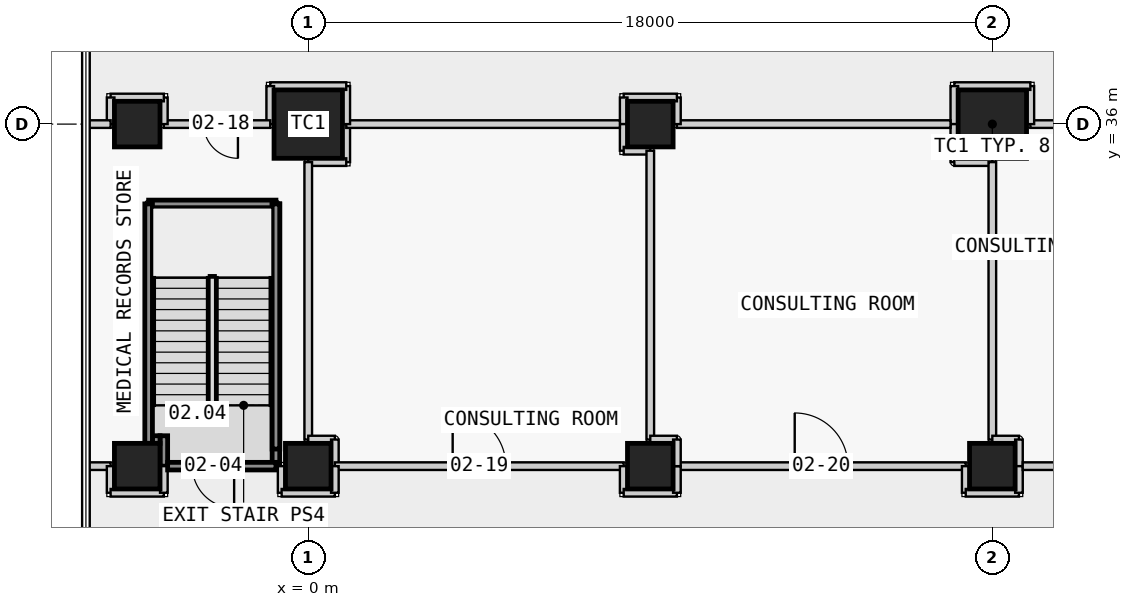
"""IFC4 building model, lengths in metres.
Left out: names, types, materials, properties, quantities, classifications, styles, units other than length and angle.
Written with IfcOpenShell. Run it as: python <this file> out.ifc"""

import sys

from ifc_helpers import new_model, si_unit, direction, frame, frame_2d, origin, origin_2d, place, context, subcontext, project, spatial, rectangle, extrude, element, fill, save


model = new_model("IFC4")
c1 = context("Model", 3, precision=1e-05, world=origin(), true_north=direction((0.0, 1.0)))
c2 = subcontext(c1, "Body", "Model", "MODEL_VIEW")
j1 = project(units=[si_unit("LENGTHUNIT", "METRE"), si_unit("PLANEANGLEUNIT", "RADIAN")], contexts=[c1])
p1 = place(None, origin())
s1 = spatial("IfcSite", under=j1, at=p1, CompositionType="ELEMENT")
p2 = place(p1, origin())
s2 = spatial("IfcBuilding", under=s1, at=p2, CompositionType="ELEMENT")
p3 = place(p2, frame((0.0, 0.0, 12.8)))
s3 = spatial("IfcBuildingStorey", under=s2, at=p3, CompositionType="ELEMENT", Elevation=12.8)
for number, where, z_axis, x_axis in (
    (1, (-4.5, 27.0, 0.0), (0.0, 0.0, 1.0), (1.0, 0.0, 0.0)),
    (2, (-4.5, 36.0, 0.0), (0.0, 0.0, 1.0), (1.0, 0.0, 0.0)),
    (3, (0.0, 27.0, 0.0), (0.0, 0.0, 1.0), (1.0, 0.0, 0.0)),
):
    element("IfcColumn", number, at=place(p3, frame(where, z_axis=z_axis, x_axis=x_axis)), inside=s3, PredefinedType="COLUMN", context=c2, shape_type="SweptSolid", body=[
        extrude(rectangle(XDim=1.2, YDim=1.2, at=origin_2d()), origin(), (0.0, 0.0, 1.0), 4.5),
    ])
p4 = place(p3, frame((0.0, 36.0, 0.0), z_axis=(0.0, 0.0, 1.0), x_axis=(1.0, 0.0, 0.0)))
e4 = element("IfcColumn", 4, at=p4, inside=s3, PredefinedType="COLUMN", context=c2, shape_type="SweptSolid", body=[
    extrude(rectangle(XDim=1.8, YDim=1.8, at=origin_2d()), origin(), (0.0, 0.0, 1.0), 4.5),
])
for number, where, z_axis, x_axis in (
    (5, (9.0, 27.0, 0.0), (0.0, 0.0, 1.0), (1.0, 0.0, 0.0)),
    (6, (9.0, 36.0, 0.0), (0.0, 0.0, 1.0), (1.0, 0.0, 0.0)),
    (7, (18.0, 27.0, 0.0), (0.0, 0.0, 1.0), (1.0, 0.0, 0.0)),
):
    element("IfcColumn", number, at=place(p3, frame(where, z_axis=z_axis, x_axis=x_axis)), inside=s3, PredefinedType="COLUMN", context=c2, shape_type="SweptSolid", body=[
        extrude(rectangle(XDim=1.2, YDim=1.2, at=origin_2d()), origin(), (0.0, 0.0, 1.0), 4.5),
    ])
p5 = place(p3, frame((18.0, 36.0, 0.0), z_axis=(0.0, 0.0, 1.0), x_axis=(1.0, 0.0, 0.0)))
e8 = element("IfcColumn", 8, at=p5, inside=s3, PredefinedType="COLUMN", context=c2, shape_type="SweptSolid", body=[
    extrude(rectangle(XDim=1.8, YDim=1.8, at=origin_2d()), origin(), (0.0, 0.0, 1.0), 4.5),
])
p6 = place(p3, frame((26.3, 36.0, 0.0), z_axis=(0.0, 0.0, 1.0), x_axis=(-1.0, 0.0, 0.0)))
e9 = element("IfcWall", 9, at=p6, inside=s3, PredefinedType="PARTITIONING", context=c2, shape_type="SweptSolid", body=[
    extrude(rectangle(XDim=7.3, YDim=0.2, at=frame_2d((3.65, 0.0))), origin(), (0.0, 0.0, 1.0), 3.45),
])
p7 = place(p6, frame((2.85, 0.0, 0.0)))
e10 = element("IfcOpeningElement", 10, at=p7, cuts=e9, PredefinedType="OPENING", context=c2, shape_type="SweptSolid", body=[
    extrude(rectangle(XDim=1.4, YDim=2.1, at=frame_2d((0.7, 1.05))), frame((0.0, 0.11, 0.0), z_axis=(0.0, -1.0, 0.0), x_axis=(1.0, 0.0, 0.0)), (0.0, 0.0, 1.0), 0.22),
])
p8 = place(p3, frame((19.0, 36.0, 0.0), z_axis=(0.0, 0.0, 1.0), x_axis=(0.0, 1.0, 0.0)))
e11 = element("IfcWall", 11, at=p8, inside=s3, PredefinedType="PARTITIONING", context=c2, shape_type="SweptSolid", body=[
    extrude(rectangle(XDim=1.0, YDim=0.2, at=frame_2d((0.5, 0.0))), origin(), (0.0, 0.0, 1.0), 3.45),
])
p9 = place(p3, frame((19.0, 37.0, 0.0), z_axis=(0.0, 0.0, 1.0), x_axis=(-1.0, 0.0, 0.0)))
e12 = element("IfcWall", 12, at=p9, inside=s3, PredefinedType="PARTITIONING", context=c2, shape_type="SweptSolid", body=[
    extrude(rectangle(XDim=2.0, YDim=0.2, at=frame_2d((1.0, 0.0))), origin(), (0.0, 0.0, 1.0), 3.45),
])
for number, where, z_axis, x_axis in (
    (13, (17.0, 37.0, 0.0), (0.0, 0.0, 1.0), (0.0, -1.0, 0.0)),
    (14, (17.0, 36.0, 0.0), (0.0, 0.0, 1.0), (0.0, -1.0, 0.0)),
    (15, (17.0, 35.0, 0.0), (0.0, 0.0, 1.0), (1.0, 0.0, 0.0)),
):
    element("IfcWall", number, at=place(p3, frame(where, z_axis=z_axis, x_axis=x_axis)), inside=s3, PredefinedType="PARTITIONING", context=c2, shape_type="SweptSolid", body=[
        extrude(rectangle(XDim=1.0, YDim=0.2, at=frame_2d((0.5, 0.0))), origin(), (0.0, 0.0, 1.0), 3.45),
    ])
p10 = place(p3, frame((18.0, 35.0, 0.0), z_axis=(0.0, 0.0, 1.0), x_axis=(0.0, -1.0, 0.0)))
e16 = element("IfcWall", 16, at=p10, inside=s3, PredefinedType="PARTITIONING", context=c2, shape_type="SweptSolid", body=[
    extrude(rectangle(XDim=7.3, YDim=0.2, at=frame_2d((3.65, 0.0))), origin(), (0.0, 0.0, 1.0), 3.45),
])
for number, where, z_axis, x_axis in (
    (17, (18.0, 27.7, 0.0), (0.0, 0.0, 1.0), (1.0, 0.0, 0.0)),
    (18, (18.7, 27.7, 0.0), (0.0, 0.0, 1.0), (0.0, -1.0, 0.0)),
):
    element("IfcWall", number, at=place(p3, frame(where, z_axis=z_axis, x_axis=x_axis)), inside=s3, PredefinedType="PARTITIONING", context=c2, shape_type="SweptSolid", body=[
        extrude(rectangle(XDim=0.7, YDim=0.2, at=frame_2d((0.35, 0.0))), origin(), (0.0, 0.0, 1.0), 3.45),
    ])
for number, where, z_axis, x_axis in (
    (19, (1.0, 36.0, 0.0), (0.0, 0.0, 1.0), (0.0, -1.0, 0.0)),
    (20, (1.0, 35.0, 0.0), (0.0, 0.0, 1.0), (-1.0, 0.0, 0.0)),
):
    element("IfcWall", number, at=place(p3, frame(where, z_axis=z_axis, x_axis=x_axis)), inside=s3, PredefinedType="PARTITIONING", context=c2, shape_type="SweptSolid", body=[
        extrude(rectangle(XDim=1.0, YDim=0.2, at=frame_2d((0.5, 0.0))), origin(), (0.0, 0.0, 1.0), 3.45),
    ])
p11 = place(p3, frame((0.0, 35.0, 0.0), z_axis=(0.0, 0.0, 1.0), x_axis=(0.0, -1.0, 0.0)))
e21 = element("IfcWall", 21, at=p11, inside=s3, PredefinedType="PARTITIONING", context=c2, shape_type="SweptSolid", body=[
    extrude(rectangle(XDim=7.3, YDim=0.2, at=frame_2d((3.65, 0.0))), origin(), (0.0, 0.0, 1.0), 3.45),
])
for number, where, z_axis, x_axis in (
    (22, (0.0, 27.7, 0.0), (0.0, 0.0, 1.0), (1.0, 0.0, 0.0)),
    (23, (0.7, 27.7, 0.0), (0.0, 0.0, 1.0), (0.0, -1.0, 0.0)),
):
    element("IfcWall", number, at=place(p3, frame(where, z_axis=z_axis, x_axis=x_axis)), inside=s3, PredefinedType="PARTITIONING", context=c2, shape_type="SweptSolid", body=[
        extrude(rectangle(XDim=0.7, YDim=0.2, at=frame_2d((0.35, 0.0))), origin(), (0.0, 0.0, 1.0), 3.45),
    ])
p12 = place(p3, frame((9.7, 27.0, 0.0), z_axis=(0.0, 0.0, 1.0), x_axis=(1.0, 0.0, 0.0)))
e24 = element("IfcWall", 24, at=p12, inside=s3, PredefinedType="PARTITIONING", context=c2, shape_type="SweptSolid", body=[
    extrude(rectangle(XDim=7.6, YDim=0.2, at=frame_2d((3.8, 0.0))), origin(), (0.0, 0.0, 1.0), 3.45),
])
p13 = place(p12, frame((3.1, 0.0, 0.0)))
e25 = element("IfcOpeningElement", 25, at=p13, cuts=e24, PredefinedType="OPENING", context=c2, shape_type="SweptSolid", body=[
    extrude(rectangle(XDim=1.4, YDim=2.1, at=frame_2d((0.7, 1.05))), frame((0.0, 0.11, 0.0), z_axis=(0.0, -1.0, 0.0), x_axis=(1.0, 0.0, 0.0)), (0.0, 0.0, 1.0), 0.22),
])
p14 = place(p3, frame((17.3, 27.0, 0.0), z_axis=(0.0, 0.0, 1.0), x_axis=(0.0, -1.0, 0.0)))
e26 = element("IfcWall", 26, at=p14, inside=s3, PredefinedType="PARTITIONING", context=c2, shape_type="SweptSolid", body=[
    extrude(rectangle(XDim=0.7, YDim=0.2, at=frame_2d((0.35, 0.0))), origin(), (0.0, 0.0, 1.0), 3.45),
])
p15 = place(p3, frame((17.3, 26.3, 0.0), z_axis=(0.0, 0.0, 1.0), x_axis=(1.0, 0.0, 0.0)))
e27 = element("IfcWall", 27, at=p15, inside=s3, PredefinedType="PARTITIONING", context=c2, shape_type="SweptSolid", body=[
    extrude(rectangle(XDim=1.4, YDim=0.2, at=frame_2d((0.7, 0.0))), origin(), (0.0, 0.0, 1.0), 4.15),
])
p16 = place(p3, frame((18.7, 26.3, 0.0), z_axis=(0.0, 0.0, 1.0), x_axis=(0.0, 1.0, 0.0)))
e28 = element("IfcWall", 28, at=p16, inside=s3, PredefinedType="PARTITIONING", context=c2, shape_type="SweptSolid", body=[
    extrude(rectangle(XDim=0.7, YDim=0.2, at=frame_2d((0.35, 0.0))), origin(), (0.0, 0.0, 1.0), 3.45),
])
p17 = place(p3, frame((0.7, 27.0, 0.0), z_axis=(0.0, 0.0, 1.0), x_axis=(1.0, 0.0, 0.0)))
e29 = element("IfcWall", 29, at=p17, inside=s3, PredefinedType="PARTITIONING", context=c2, shape_type="SweptSolid", body=[
    extrude(rectangle(XDim=7.6, YDim=0.2, at=frame_2d((3.8, 0.0))), origin(), (0.0, 0.0, 1.0), 3.45),
])
p18 = place(p17, frame((3.1, 0.0, 0.0)))
e30 = element("IfcOpeningElement", 30, at=p18, cuts=e29, PredefinedType="OPENING", context=c2, shape_type="SweptSolid", body=[
    extrude(rectangle(XDim=1.4, YDim=2.1, at=frame_2d((0.7, 1.05))), frame((0.0, 0.11, 0.0), z_axis=(0.0, -1.0, 0.0), x_axis=(1.0, 0.0, 0.0)), (0.0, 0.0, 1.0), 0.22),
])
p19 = place(p3, frame((8.3, 27.0, 0.0), z_axis=(0.0, 0.0, 1.0), x_axis=(0.0, -1.0, 0.0)))
e31 = element("IfcWall", 31, at=p19, inside=s3, PredefinedType="PARTITIONING", context=c2, shape_type="SweptSolid", body=[
    extrude(rectangle(XDim=0.7, YDim=0.2, at=frame_2d((0.35, 0.0))), origin(), (0.0, 0.0, 1.0), 3.45),
])
p20 = place(p3, frame((8.3, 26.3, 0.0), z_axis=(0.0, 0.0, 1.0), x_axis=(1.0, 0.0, 0.0)))
e32 = element("IfcWall", 32, at=p20, inside=s3, PredefinedType="PARTITIONING", context=c2, shape_type="SweptSolid", body=[
    extrude(rectangle(XDim=1.4, YDim=0.2, at=frame_2d((0.7, 0.0))), origin(), (0.0, 0.0, 1.0), 4.15),
])
p21 = place(p3, frame((9.7, 26.3, 0.0), z_axis=(0.0, 0.0, 1.0), x_axis=(0.0, 1.0, 0.0)))
e33 = element("IfcWall", 33, at=p21, inside=s3, PredefinedType="PARTITIONING", context=c2, shape_type="SweptSolid", body=[
    extrude(rectangle(XDim=0.7, YDim=0.2, at=frame_2d((0.35, 0.0))), origin(), (0.0, 0.0, 1.0), 3.45),
])
p22 = place(p3, frame((-4.2, 33.9, 0.0), z_axis=(0.0, 0.0, 1.0), x_axis=(1.0, 0.0, 0.0)))
e34 = element("IfcWall", 34, at=p22, inside=s3, PredefinedType="PARTITIONING", context=c2, shape_type="SweptSolid", body=[
    extrude(rectangle(XDim=3.35, YDim=0.2, at=frame_2d((1.675, 0.0))), origin(), (0.0, 0.0, 1.0), 4.15),
])
p23 = place(p3, frame((-0.85, 33.9, 0.0), z_axis=(0.0, 0.0, 1.0), x_axis=(0.0, -1.0, 0.0)))
e35 = element("IfcWall", 35, at=p23, inside=s3, PredefinedType="PARTITIONING", context=c2, shape_type="SweptSolid", body=[
    extrude(rectangle(XDim=6.9, YDim=0.2, at=frame_2d((3.45, 0.0))), origin(), (0.0, 0.0, 1.0), 3.45),
])
p24 = place(p3, frame((16.9, 36.0, 0.0), z_axis=(0.0, 0.0, 1.0), x_axis=(-1.0, 0.0, 0.0)))
e36 = element("IfcWall", 36, at=p24, inside=s3, PredefinedType="PARTITIONING", context=c2, shape_type="SweptSolid", body=[
    extrude(rectangle(XDim=7.2, YDim=0.2, at=frame_2d((3.6, 0.0))), origin(), (0.0, 0.0, 1.0), 3.45),
])
p25 = place(p3, frame((9.7, 36.0, 0.0), z_axis=(0.0, 0.0, 1.0), x_axis=(0.0, 1.0, 0.0)))
e37 = element("IfcWall", 37, at=p25, inside=s3, PredefinedType="PARTITIONING", context=c2, shape_type="SweptSolid", body=[
    extrude(rectangle(XDim=0.7, YDim=0.2, at=frame_2d((0.35, 0.0))), origin(), (0.0, 0.0, 1.0), 3.45),
])
p26 = place(p3, frame((9.7, 36.7, 0.0), z_axis=(0.0, 0.0, 1.0), x_axis=(-1.0, 0.0, 0.0)))
e38 = element("IfcWall", 38, at=p26, inside=s3, PredefinedType="PARTITIONING", context=c2, shape_type="SweptSolid", body=[
    extrude(rectangle(XDim=1.4, YDim=0.2, at=frame_2d((0.7, 0.0))), origin(), (0.0, 0.0, 1.0), 4.15),
])
for number, where, z_axis, x_axis in (
    (39, (8.3, 36.7, 0.0), (0.0, 0.0, 1.0), (0.0, -1.0, 0.0)),
    (40, (8.3, 36.0, 0.0), (0.0, 0.0, 1.0), (0.0, -1.0, 0.0)),
    (41, (8.3, 35.3, 0.0), (0.0, 0.0, 1.0), (1.0, 0.0, 0.0)),
):
    element("IfcWall", number, at=place(p3, frame(where, z_axis=z_axis, x_axis=x_axis)), inside=s3, PredefinedType="PARTITIONING", context=c2, shape_type="SweptSolid", body=[
        extrude(rectangle(XDim=0.7, YDim=0.2, at=frame_2d((0.35, 0.0))), origin(), (0.0, 0.0, 1.0), 3.45),
    ])
p27 = place(p3, frame((9.0, 35.3, 0.0), z_axis=(0.0, 0.0, 1.0), x_axis=(0.0, -1.0, 0.0)))
e42 = element("IfcWall", 42, at=p27, inside=s3, PredefinedType="PARTITIONING", context=c2, shape_type="SweptSolid", body=[
    extrude(rectangle(XDim=7.6, YDim=0.2, at=frame_2d((3.8, 0.0))), origin(), (0.0, 0.0, 1.0), 3.45),
])
p28 = place(p3, frame((18.8, 27.0, 0.0), z_axis=(0.0, 0.0, 1.0), x_axis=(1.0, 0.0, 0.0)))
e43 = element("IfcWall", 43, at=p28, inside=s3, PredefinedType="PARTITIONING", context=c2, shape_type="SweptSolid", body=[
    extrude(rectangle(XDim=7.5, YDim=0.2, at=frame_2d((3.75, 0.0))), origin(), (0.0, 0.0, 1.0), 3.45),
])
p29 = place(p3, frame((8.2, 36.0, 0.0), z_axis=(0.0, 0.0, 1.0), x_axis=(-1.0, 0.0, 0.0)))
e44 = element("IfcWall", 44, at=p29, inside=s3, PredefinedType="PARTITIONING", context=c2, shape_type="SweptSolid", body=[
    extrude(rectangle(XDim=7.2, YDim=0.2, at=frame_2d((3.6, 0.0))), origin(), (0.0, 0.0, 1.0), 3.45),
])
p30 = place(p3, frame((-3.8, 27.0, 0.0), z_axis=(0.0, 0.0, 1.0), x_axis=(0.0, 1.0, 0.0)))
e45 = element("IfcWall", 45, at=p30, inside=s3, PredefinedType="PARTITIONING", context=c2, shape_type="SweptSolid", body=[
    extrude(rectangle(XDim=0.8, YDim=0.2, at=frame_2d((0.4, 0.0))), origin(), (0.0, 0.0, 1.0), 3.45),
])
p31 = place(p3, frame((-3.9, 27.7, 0.0), z_axis=(0.0, 0.0, 1.0), x_axis=(-1.0, 0.0, 0.0)))
e46 = element("IfcWall", 46, at=p31, inside=s3, PredefinedType="PARTITIONING", context=c2, shape_type="SweptSolid", body=[
    extrude(rectangle(XDim=0.2, YDim=0.2, at=frame_2d((0.1, 0.0))), origin(), (0.0, 0.0, 1.0), 4.15),
])
p32 = place(p3, frame((-4.2, 27.6, 0.0), z_axis=(0.0, 0.0, 1.0), x_axis=(0.0, 1.0, 0.0)))
e47 = element("IfcWall", 47, at=p32, inside=s3, PredefinedType="PARTITIONING", context=c2, shape_type="SweptSolid", body=[
    extrude(rectangle(XDim=6.3, YDim=0.2, at=frame_2d((3.15, 0.0))), origin(), (0.0, 0.0, 1.0), 4.15),
])
p33 = place(p3, frame((1.0, 36.0, 0.0), z_axis=(0.0, 0.0, 1.0), x_axis=(0.0, 1.0, 0.0)))
e48 = element("IfcWall", 48, at=p33, inside=s3, PredefinedType="PARTITIONING", context=c2, shape_type="SweptSolid", body=[
    extrude(rectangle(XDim=1.0, YDim=0.2, at=frame_2d((0.5, 0.0))), origin(), (0.0, 0.0, 1.0), 3.45),
])
p34 = place(p3, frame((1.0, 37.0, 0.0), z_axis=(0.0, 0.0, 1.0), x_axis=(-1.0, 0.0, 0.0)))
e49 = element("IfcWall", 49, at=p34, inside=s3, PredefinedType="PARTITIONING", context=c2, shape_type="SweptSolid", body=[
    extrude(rectangle(XDim=2.0, YDim=0.2, at=frame_2d((1.0, 0.0))), origin(), (0.0, 0.0, 1.0), 3.45),
])
p35 = place(p3, frame((-1.0, 37.0, 0.0), z_axis=(0.0, 0.0, 1.0), x_axis=(0.0, -1.0, 0.0)))
e50 = element("IfcWall", 50, at=p35, inside=s3, PredefinedType="PARTITIONING", context=c2, shape_type="SweptSolid", body=[
    extrude(rectangle(XDim=1.0, YDim=0.2, at=frame_2d((0.5, 0.0))), origin(), (0.0, 0.0, 1.0), 3.45),
])
p36 = place(p3, frame((-1.0, 36.0, 0.0), z_axis=(0.0, 0.0, 1.0), x_axis=(-1.0, 0.0, 0.0)))
e51 = element("IfcWall", 51, at=p36, inside=s3, PredefinedType="PARTITIONING", context=c2, shape_type="SweptSolid", body=[
    extrude(rectangle(XDim=2.8, YDim=0.2, at=frame_2d((1.4, 0.0))), origin(), (0.0, 0.0, 1.0), 3.45),
])
p37 = place(p36, frame((0.85, 0.0, 0.0)))
e52 = element("IfcOpeningElement", 52, at=p37, cuts=e51, PredefinedType="OPENING", context=c2, shape_type="SweptSolid", body=[
    extrude(rectangle(XDim=0.9, YDim=2.1, at=frame_2d((0.45, 1.05))), frame((0.0, 0.11, 0.0), z_axis=(0.0, -1.0, 0.0), x_axis=(1.0, 0.0, 0.0)), (0.0, 0.0, 1.0), 0.22),
])
p38 = place(p3, frame((-5.85, 27.0, 0.0), z_axis=(0.0, 0.0, 1.0), x_axis=(1.0, 0.0, 0.0)))
e53 = element("IfcWall", 53, at=p38, inside=s3, PredefinedType="PARTITIONING", context=c2, shape_type="SweptSolid", body=[
    extrude(rectangle(XDim=0.65, YDim=0.2, at=frame_2d((0.325, 0.0))), origin(), (0.0, 0.0, 1.0), 4.15),
])
p39 = place(p3, frame((-5.2, 27.0, 0.0), z_axis=(0.0, 0.0, 1.0), x_axis=(0.0, -1.0, 0.0)))
e54 = element("IfcWall", 54, at=p39, inside=s3, PredefinedType="PARTITIONING", context=c2, shape_type="SweptSolid", body=[
    extrude(rectangle(XDim=0.7, YDim=0.2, at=frame_2d((0.35, 0.0))), origin(), (0.0, 0.0, 1.0), 4.15),
])
p40 = place(p3, frame((-5.2, 26.3, 0.0), z_axis=(0.0, 0.0, 1.0), x_axis=(1.0, 0.0, 0.0)))
e55 = element("IfcWall", 55, at=p40, inside=s3, PredefinedType="PARTITIONING", context=c2, shape_type="SweptSolid", body=[
    extrude(rectangle(XDim=1.4, YDim=0.2, at=frame_2d((0.7, 0.0))), origin(), (0.0, 0.0, 1.0), 3.45),
])
for number, where, z_axis, x_axis in (
    (56, (-3.8, 26.3, 0.0), (0.0, 0.0, 1.0), (0.0, 1.0, 0.0)),
    (57, (-3.8, 36.0, 0.0), (0.0, 0.0, 1.0), (0.0, 1.0, 0.0)),
):
    element("IfcWall", number, at=place(p3, frame(where, z_axis=z_axis, x_axis=x_axis)), inside=s3, PredefinedType="PARTITIONING", context=c2, shape_type="SweptSolid", body=[
        extrude(rectangle(XDim=0.7, YDim=0.2, at=frame_2d((0.35, 0.0))), origin(), (0.0, 0.0, 1.0), 3.45),
    ])
p41 = place(p3, frame((-3.8, 36.7, 0.0), z_axis=(0.0, 0.0, 1.0), x_axis=(-1.0, 0.0, 0.0)))
e58 = element("IfcWall", 58, at=p41, inside=s3, PredefinedType="PARTITIONING", context=c2, shape_type="SweptSolid", body=[
    extrude(rectangle(XDim=1.4, YDim=0.2, at=frame_2d((0.7, 0.0))), origin(), (0.0, 0.0, 1.0), 3.45),
])
p42 = place(p3, frame((-5.2, 36.7, 0.0), z_axis=(0.0, 0.0, 1.0), x_axis=(0.0, -1.0, 0.0)))
e59 = element("IfcWall", 59, at=p42, inside=s3, PredefinedType="PARTITIONING", context=c2, shape_type="SweptSolid", body=[
    extrude(rectangle(XDim=0.7, YDim=0.2, at=frame_2d((0.35, 0.0))), origin(), (0.0, 0.0, 1.0), 4.15),
])
p43 = place(p3, frame((-5.2, 36.0, 0.0), z_axis=(0.0, 0.0, 1.0), x_axis=(-1.0, 0.0, 0.0)))
e60 = element("IfcWall", 60, at=p43, inside=s3, PredefinedType="PARTITIONING", context=c2, shape_type="SweptSolid", body=[
    extrude(rectangle(XDim=0.65, YDim=0.2, at=frame_2d((0.325, 0.0))), origin(), (0.0, 0.0, 1.0), 4.15),
])
p44 = place(p3, frame((-0.85, 27.0, 0.0), z_axis=(0.0, 0.0, 1.0), x_axis=(-1.0, 0.0, 0.0)))
e61 = element("IfcWall", 61, at=p44, inside=s3, PredefinedType="PARTITIONING", context=c2, shape_type="SweptSolid", body=[
    extrude(rectangle(XDim=2.85, YDim=0.2, at=frame_2d((1.425, 0.0))), origin(), (0.0, 0.0, 1.0), 3.45),
])
p45 = place(p44, frame((1.1, 0.0, 0.0)))
e62 = element("IfcOpeningElement", 62, at=p45, cuts=e61, PredefinedType="OPENING", context=c2, shape_type="SweptSolid", body=[
    extrude(rectangle(XDim=1.1, YDim=2.1, at=frame_2d((0.55, 1.05))), frame((0.0, 0.11, 0.0), z_axis=(0.0, -1.0, 0.0), x_axis=(1.0, 0.0, 0.0)), (0.0, 0.0, 1.0), 0.22),
])
p46 = place(p3, frame((-0.7, 27.0, 0.0), z_axis=(0.0, 0.0, 1.0), x_axis=(0.0, -1.0, 0.0)))
e63 = element("IfcWall", 63, at=p46, inside=s3, PredefinedType="PARTITIONING", context=c2, shape_type="SweptSolid", body=[
    extrude(rectangle(XDim=0.7, YDim=0.2, at=frame_2d((0.35, 0.0))), origin(), (0.0, 0.0, 1.0), 3.45),
])
p47 = place(p3, frame((-0.7, 26.3, 0.0), z_axis=(0.0, 0.0, 1.0), x_axis=(1.0, 0.0, 0.0)))
e64 = element("IfcWall", 64, at=p47, inside=s3, PredefinedType="PARTITIONING", context=c2, shape_type="SweptSolid", body=[
    extrude(rectangle(XDim=1.4, YDim=0.2, at=frame_2d((0.7, 0.0))), origin(), (0.0, 0.0, 1.0), 4.15),
])
for number, where, z_axis, x_axis in (
    (65, (9.0, 27.7, 0.0), (0.0, 0.0, 1.0), (1.0, 0.0, 0.0)),
    (66, (9.7, 27.7, 0.0), (0.0, 0.0, 1.0), (0.0, -1.0, 0.0)),
    (67, (0.7, 26.3, 0.0), (0.0, 0.0, 1.0), (0.0, 1.0, 0.0)),
):
    element("IfcWall", number, at=place(p3, frame(where, z_axis=z_axis, x_axis=x_axis)), inside=s3, PredefinedType="PARTITIONING", context=c2, shape_type="SweptSolid", body=[
        extrude(rectangle(XDim=0.7, YDim=0.2, at=frame_2d((0.35, 0.0))), origin(), (0.0, 0.0, 1.0), 3.45),
    ])
p48 = place(p3, frame((-0.85, 33.9, 3.45), z_axis=(0.0, 0.0, 1.0), x_axis=(0.0, -1.0, 0.0)))
e68 = element("IfcWall", 68, at=p48, inside=s3, PredefinedType="PARTITIONING", context=c2, shape_type="SweptSolid", body=[
    extrude(rectangle(XDim=6.45, YDim=0.2, at=frame_2d((3.225, 0.0))), origin(), (0.0, 0.0, 1.0), 0.7),
])
p49 = place(p45, origin())
e69 = element("IfcDoor", 69, at=p49, inside=s3, OperationType="SINGLE_SWING_LEFT", PredefinedType="DOOR", context=c2, shape_type="SweptSolid", body=[
    extrude(rectangle(XDim=1.1, YDim=2.1, at=frame_2d((0.55, 1.05))), frame((0.0, 0.025, 0.0), z_axis=(0.0, -1.0, 0.0), x_axis=(1.0, 0.0, 0.0)), (0.0, 0.0, 1.0), 0.05),
])
fill(e62, e69)
p50 = place(p37, origin())
e70 = element("IfcDoor", 70, at=p50, inside=s3, OperationType="SINGLE_SWING_LEFT", PredefinedType="DOOR", context=c2, shape_type="SweptSolid", body=[
    extrude(rectangle(XDim=0.9, YDim=2.1, at=frame_2d((0.45, 1.05))), frame((0.0, 0.025, 0.0), z_axis=(0.0, -1.0, 0.0), x_axis=(1.0, 0.0, 0.0)), (0.0, 0.0, 1.0), 0.05),
])
fill(e52, e70)
p51 = place(p18, origin())
e71 = element("IfcDoor", 71, at=p51, inside=s3, OperationType="SINGLE_SWING_LEFT", PredefinedType="DOOR", context=c2, shape_type="SweptSolid", body=[
    extrude(rectangle(XDim=1.4, YDim=2.1, at=frame_2d((0.7, 1.05))), frame((0.0, 0.025, 0.0), z_axis=(0.0, -1.0, 0.0), x_axis=(1.0, 0.0, 0.0)), (0.0, 0.0, 1.0), 0.05),
])
fill(e30, e71)
p52 = place(p13, origin())
e72 = element("IfcDoor", 72, at=p52, inside=s3, OperationType="SINGLE_SWING_LEFT", PredefinedType="DOOR", context=c2, shape_type="SweptSolid", body=[
    extrude(rectangle(XDim=1.4, YDim=2.1, at=frame_2d((0.7, 1.05))), frame((0.0, 0.025, 0.0), z_axis=(0.0, -1.0, 0.0), x_axis=(1.0, 0.0, 0.0)), (0.0, 0.0, 1.0), 0.05),
])
fill(e25, e72)
save(model, sys.argv[1])
